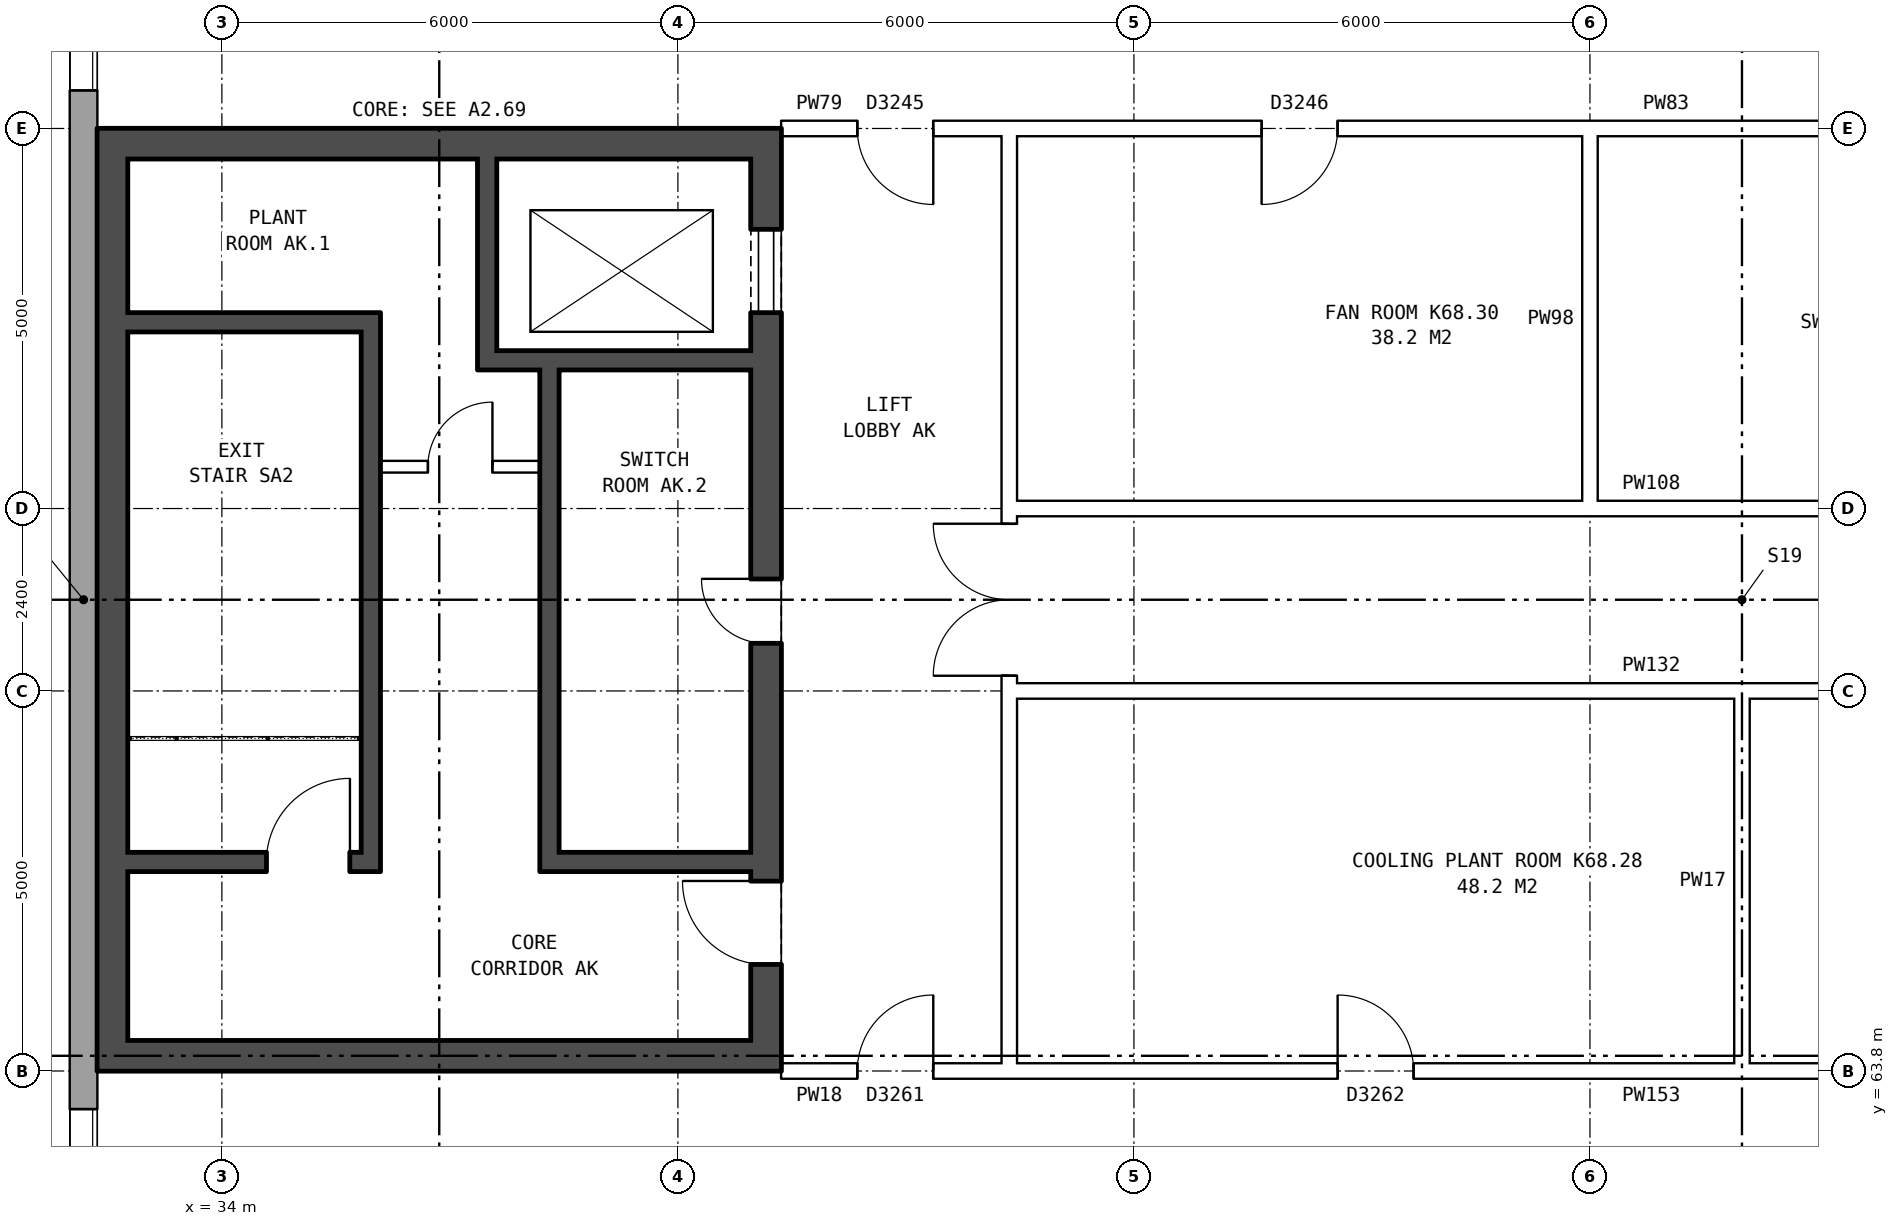
"""IFC4 building model, lengths in metres.
Left out: names, types, materials, properties, quantities, classifications, styles, units other than length and angle.
Written with IfcOpenShell. Run it as: python <this file> out.ifc"""

import sys

from ifc_helpers import new_model, si_unit, direction, frame, frame_2d, origin, place, context, subcontext, project, spatial, polyline, rectangle, outline, extrude, element, fill, save


model = new_model("IFC4")
c1 = context("Model", 3, precision=1e-05, world=origin(), true_north=direction((0.0, 1.0)))
c2 = subcontext(c1, "Body", "Model", "MODEL_VIEW")
j1 = project(units=[si_unit("LENGTHUNIT", "METRE"), si_unit("PLANEANGLEUNIT", "RADIAN")], contexts=[c1])
p1 = place(None, origin())
s1 = spatial("IfcSite", under=j1, at=p1, CompositionType="ELEMENT")
p2 = place(p1, origin())
s2 = spatial("IfcBuilding", under=s1, at=p2, CompositionType="ELEMENT")
p3 = place(p2, frame((0.0, 0.0, 243.9)))
s3 = spatial("IfcBuildingStorey", under=s2, at=p3, CompositionType="ELEMENT", Elevation=243.9)
p4 = place(p3, frame((32.18, 82.925, 0.0), z_axis=(0.0, 0.0, 1.0), x_axis=(0.0, -1.0, 0.0)))
e1 = element("IfcWall", 1, at=p4, inside=s3, PredefinedType="STANDARD", context=c2, shape_type="SweptSolid", body=[
    extrude(outline(polyline([(0.0, 0.0), (25.851, 0.0), (25.851, 4.837), (0.0, 17.763), (0.0, 0.0)])), frame((0.0, 0.18, 0.0), z_axis=(0.0, -1.0, 0.0), x_axis=(1.0, 0.0, 0.0)), (0.0, 0.0, 1.0), 0.36),
])
p5 = place(p4, frame((22.625, 0.0, 1.5)))
e2 = element("IfcOpeningElement", 2, at=p5, cuts=e1, PredefinedType="OPENING", context=c2, shape_type="SweptSolid", body=[
    extrude(rectangle(XDim=1.6, YDim=1.2, at=frame_2d((0.8, 0.6))), frame((0.0, 0.19, 0.0), z_axis=(0.0, -1.0, 0.0), x_axis=(1.0, 0.0, 0.0)), (0.0, 0.0, 1.0), 0.38),
])
p6 = place(p4, frame((19.625, 0.0, 1.5)))
e3 = element("IfcOpeningElement", 3, at=p6, cuts=e1, PredefinedType="OPENING", context=c2, shape_type="SweptSolid", body=[
    extrude(rectangle(XDim=1.6, YDim=1.2, at=frame_2d((0.8, 0.6))), frame((0.0, 0.19, 0.0), z_axis=(0.0, -1.0, 0.0), x_axis=(1.0, 0.0, 0.0)), (0.0, 0.0, 1.0), 0.38),
])
p7 = place(p4, frame((4.625, 0.0, 1.5)))
e4 = element("IfcOpeningElement", 4, at=p7, cuts=e1, PredefinedType="OPENING", context=c2, shape_type="SweptSolid", body=[
    extrude(rectangle(XDim=1.6, YDim=1.2, at=frame_2d((0.8, 0.6))), frame((0.0, 0.19, 0.0), z_axis=(0.0, -1.0, 0.0), x_axis=(1.0, 0.0, 0.0)), (0.0, 0.0, 1.0), 0.38),
])
p8 = place(p4, frame((1.625, 0.0, 1.5)))
e5 = element("IfcOpeningElement", 5, at=p8, cuts=e1, PredefinedType="OPENING", context=c2, shape_type="SweptSolid", body=[
    extrude(rectangle(XDim=1.6, YDim=1.2, at=frame_2d((0.8, 0.6))), frame((0.0, 0.19, 0.0), z_axis=(0.0, -1.0, 0.0), x_axis=(1.0, 0.0, 0.0)), (0.0, 0.0, 1.0), 0.38),
])
p9 = place(p3, frame((41.16, 76.2, 0.0), z_axis=(0.0, 0.0, 1.0), x_axis=(0.0, -1.0, 0.0)))
e6 = element("IfcWall", 6, at=p9, inside=s3, PredefinedType="SHEAR", context=c2, shape_type="SweptSolid", body=[
    extrude(rectangle(XDim=12.4, YDim=0.4, at=frame_2d((6.2, 0.0))), origin(), (0.0, 0.0, 1.0), 3.3),
])
p10 = place(p9, frame((1.325, 0.0, 0.0)))
e7 = element("IfcOpeningElement", 7, at=p10, cuts=e6, PredefinedType="OPENING", context=c2, shape_type="SweptSolid", body=[
    extrude(rectangle(XDim=1.1, YDim=2.1, at=frame_2d((0.55, 1.05))), frame((0.0, 0.21, 0.0), z_axis=(0.0, -1.0, 0.0), x_axis=(1.0, 0.0, 0.0)), (0.0, 0.0, 1.0), 0.42),
])
p11 = place(p9, frame((5.925, 0.0, 0.0)))
e8 = element("IfcOpeningElement", 8, at=p11, cuts=e6, PredefinedType="OPENING", context=c2, shape_type="SweptSolid", body=[
    extrude(rectangle(XDim=0.85, YDim=2.1, at=frame_2d((0.425, 1.05))), frame((0.0, 0.21, 0.0), z_axis=(0.0, -1.0, 0.0), x_axis=(1.0, 0.0, 0.0)), (0.0, 0.0, 1.0), 0.42),
])
p12 = place(p9, frame((9.9, 0.0, 0.0)))
e9 = element("IfcOpeningElement", 9, at=p12, cuts=e6, PredefinedType="OPENING", context=c2, shape_type="SweptSolid", body=[
    extrude(rectangle(XDim=1.1, YDim=2.1, at=frame_2d((0.55, 1.05))), frame((0.0, 0.21, 0.0), z_axis=(0.0, -1.0, 0.0), x_axis=(1.0, 0.0, 0.0)), (0.0, 0.0, 1.0), 0.42),
])
p13 = place(p3, frame((32.56, 76.2, 0.0), z_axis=(0.0, 0.0, 1.0), x_axis=(0.0, -1.0, 0.0)))
e10 = element("IfcWall", 10, at=p13, inside=s3, PredefinedType="SHEAR", context=c2, shape_type="SweptSolid", body=[
    extrude(rectangle(XDim=12.4, YDim=0.4, at=frame_2d((6.2, 0.0))), origin(), (0.0, 0.0, 1.0), 3.3),
])
for number, where, z_axis, x_axis in (
    (11, (40.96, 76.0, 0.0), (0.0, 0.0, 1.0), (-1.0, 0.0, 0.0)),
    (12, (40.96, 64.0, 0.0), (0.0, 0.0, 1.0), (-1.0, 0.0, 0.0)),
):
    element("IfcWall", number, at=place(p3, frame(where, z_axis=z_axis, x_axis=x_axis)), inside=s3, PredefinedType="SHEAR", context=c2, shape_type="SweptSolid", body=[
        extrude(rectangle(XDim=8.2, YDim=0.4, at=frame_2d((4.1, 0.0))), origin(), (0.0, 0.0, 1.0), 3.3),
    ])
p14 = place(p3, frame((35.835, 73.65, 0.0), z_axis=(0.0, 0.0, 1.0), x_axis=(-1.0, 0.0, 0.0)))
e13 = element("IfcWall", 13, at=p14, inside=s3, PredefinedType="SHEAR", context=c2, shape_type="SweptSolid", body=[
    extrude(rectangle(XDim=3.075, YDim=0.25, at=frame_2d((1.538, 0.0))), origin(), (0.0, 0.0, 1.0), 3.3),
])
p15 = place(p3, frame((40.96, 73.15, 0.0), z_axis=(0.0, 0.0, 1.0), x_axis=(-1.0, 0.0, 0.0)))
e14 = element("IfcWall", 14, at=p15, inside=s3, PredefinedType="SHEAR", context=c2, shape_type="SweptSolid", body=[
    extrude(rectangle(XDim=3.595, YDim=0.25, at=frame_2d((1.797, 0.0))), origin(), (0.0, 0.0, 1.0), 3.3),
])
p16 = place(p3, frame((38.185, 71.75, 0.0), z_axis=(0.0, 0.0, 1.0), x_axis=(-1.0, 0.0, 0.0)))
e15 = element("IfcWall", 15, at=p16, inside=s3, PredefinedType="PARTITIONING", context=c2, shape_type="SweptSolid", body=[
    extrude(rectangle(XDim=2.1, YDim=0.15, at=frame_2d((1.05, 0.0))), origin(), (0.0, 0.0, 1.0), 3.3),
])
p17 = place(p16, frame((0.625, 0.0, 0.0)))
e16 = element("IfcOpeningElement", 16, at=p17, cuts=e15, PredefinedType="OPENING", context=c2, shape_type="SweptSolid", body=[
    extrude(rectangle(XDim=0.85, YDim=2.1, at=frame_2d((0.425, 1.05))), frame((0.0, 0.085, 0.0), z_axis=(0.0, -1.0, 0.0), x_axis=(1.0, 0.0, 0.0)), (0.0, 0.0, 1.0), 0.17),
])
p18 = place(p3, frame((40.96, 66.55, 0.0), z_axis=(0.0, 0.0, 1.0), x_axis=(-1.0, 0.0, 0.0)))
e17 = element("IfcWall", 17, at=p18, inside=s3, PredefinedType="SHEAR", context=c2, shape_type="SweptSolid", body=[
    extrude(rectangle(XDim=2.525, YDim=0.25, at=frame_2d((1.262, 0.0))), origin(), (0.0, 0.0, 1.0), 3.3),
])
p19 = place(p3, frame((35.835, 66.55, 0.0), z_axis=(0.0, 0.0, 1.0), x_axis=(-1.0, 0.0, 0.0)))
e18 = element("IfcWall", 18, at=p19, inside=s3, PredefinedType="SHEAR", context=c2, shape_type="SweptSolid", body=[
    extrude(rectangle(XDim=3.075, YDim=0.25, at=frame_2d((1.538, 0.0))), origin(), (0.0, 0.0, 1.0), 3.3),
])
p20 = place(p19, frame((0.15, 0.0, 0.0)))
e19 = element("IfcOpeningElement", 19, at=p20, cuts=e18, PredefinedType="OPENING", context=c2, shape_type="SweptSolid", body=[
    extrude(rectangle(XDim=1.1, YDim=2.1, at=frame_2d((0.55, 1.05))), frame((0.0, 0.135, 0.0), z_axis=(0.0, -1.0, 0.0), x_axis=(1.0, 0.0, 0.0)), (0.0, 0.0, 1.0), 0.27),
])
p21 = place(p3, frame((38.31, 73.025, 0.0), z_axis=(0.0, 0.0, 1.0), x_axis=(0.0, -1.0, 0.0)))
e20 = element("IfcWall", 20, at=p21, inside=s3, PredefinedType="SHEAR", context=c2, shape_type="SweptSolid", body=[
    extrude(rectangle(XDim=6.6, YDim=0.25, at=frame_2d((3.3, 0.0))), origin(), (0.0, 0.0, 1.0), 3.3),
])
p22 = place(p3, frame((37.49, 75.8, 0.0), z_axis=(0.0, 0.0, 1.0), x_axis=(0.0, -1.0, 0.0)))
e21 = element("IfcWall", 21, at=p22, inside=s3, PredefinedType="SHEAR", context=c2, shape_type="SweptSolid", body=[
    extrude(rectangle(XDim=2.525, YDim=0.25, at=frame_2d((1.263, 0.0))), origin(), (0.0, 0.0, 1.0), 3.3),
])
p23 = place(p3, frame((35.96, 73.775, 0.0), z_axis=(0.0, 0.0, 1.0), x_axis=(0.0, -1.0, 0.0)))
e22 = element("IfcWall", 22, at=p23, inside=s3, PredefinedType="SHEAR", context=c2, shape_type="SweptSolid", body=[
    extrude(rectangle(XDim=7.35, YDim=0.25, at=frame_2d((3.675, 0.0))), origin(), (0.0, 0.0, 1.0), 3.3),
])
p24 = place(p3, frame((44.36, 63.9, 0.0), z_axis=(0.0, 0.0, 1.0), x_axis=(0.0, 1.0, 0.0)))
e23 = element("IfcWall", 23, at=p24, inside=s3, PredefinedType="PARTITIONING", context=c2, shape_type="SweptSolid", body=[
    extrude(rectangle(XDim=12.2, YDim=0.2, at=frame_2d((6.1, 0.0))), origin(), (0.0, 0.0, 1.0), 3.3),
])
p25 = place(p24, frame((5.1, 0.0, 0.0)))
e24 = element("IfcOpeningElement", 24, at=p25, cuts=e23, PredefinedType="OPENING", context=c2, shape_type="SweptSolid", body=[
    extrude(rectangle(XDim=2.0, YDim=2.1, at=frame_2d((1.0, 1.05))), frame((0.0, 0.11, 0.0), z_axis=(0.0, -1.0, 0.0), x_axis=(1.0, 0.0, 0.0)), (0.0, 0.0, 1.0), 0.22),
])
p26 = place(p3, frame((44.36, 63.8, 0.0), z_axis=(0.0, 0.0, 1.0), x_axis=(1.0, 0.0, 0.0)))
e25 = element("IfcWall", 25, at=p26, inside=s3, PredefinedType="PARTITIONING", context=c2, shape_type="SweptSolid", body=[
    extrude(rectangle(XDim=19.28, YDim=0.2, at=frame_2d((9.64, 0.0))), origin(), (0.0, 0.0, 1.0), 3.3),
])
p27 = place(p26, frame((4.32, 0.0, 0.0)))
e26 = element("IfcOpeningElement", 26, at=p27, cuts=e25, PredefinedType="OPENING", context=c2, shape_type="SweptSolid", body=[
    extrude(rectangle(XDim=1.0, YDim=2.1, at=frame_2d((0.5, 1.05))), frame((0.0, 0.11, 0.0), z_axis=(0.0, -1.0, 0.0), x_axis=(1.0, 0.0, 0.0)), (0.0, 0.0, 1.0), 0.22),
])
p28 = place(p26, frame((13.96, 0.0, 0.0)))
e27 = element("IfcOpeningElement", 27, at=p28, cuts=e25, PredefinedType="OPENING", context=c2, shape_type="SweptSolid", body=[
    extrude(rectangle(XDim=1.0, YDim=2.1, at=frame_2d((0.5, 1.05))), frame((0.0, 0.11, 0.0), z_axis=(0.0, -1.0, 0.0), x_axis=(1.0, 0.0, 0.0)), (0.0, 0.0, 1.0), 0.22),
])
p29 = place(p3, frame((41.36, 63.8, 0.0), z_axis=(0.0, 0.0, 1.0), x_axis=(1.0, 0.0, 0.0)))
e28 = element("IfcWall", 28, at=p29, inside=s3, PredefinedType="PARTITIONING", context=c2, shape_type="SweptSolid", body=[
    extrude(rectangle(XDim=3.0, YDim=0.2, at=frame_2d((1.5, 0.0))), origin(), (0.0, 0.0, 1.0), 3.3),
])
p30 = place(p29, frame((1.0, 0.0, 0.0)))
e29 = element("IfcOpeningElement", 29, at=p30, cuts=e28, PredefinedType="OPENING", context=c2, shape_type="SweptSolid", body=[
    extrude(rectangle(XDim=1.0, YDim=2.1, at=frame_2d((0.5, 1.05))), frame((0.0, 0.11, 0.0), z_axis=(0.0, -1.0, 0.0), x_axis=(1.0, 0.0, 0.0)), (0.0, 0.0, 1.0), 0.22),
])
for number, where, z_axis, x_axis in (
    (30, (44.36, 68.8, 0.0), (0.0, 0.0, 1.0), (1.0, 0.0, 0.0)),
    (31, (44.36, 71.2, 0.0), (0.0, 0.0, 1.0), (1.0, 0.0, 0.0)),
):
    element("IfcWall", number, at=place(p3, frame(where, z_axis=z_axis, x_axis=x_axis)), inside=s3, PredefinedType="PARTITIONING", context=c2, shape_type="SweptSolid", body=[
        extrude(rectangle(XDim=19.28, YDim=0.2, at=frame_2d((9.64, 0.0))), origin(), (0.0, 0.0, 1.0), 3.3),
    ])
p31 = place(p3, frame((44.36, 76.2, 0.0), z_axis=(0.0, 0.0, 1.0), x_axis=(1.0, 0.0, 0.0)))
e32 = element("IfcWall", 32, at=p31, inside=s3, PredefinedType="PARTITIONING", context=c2, shape_type="SweptSolid", body=[
    extrude(rectangle(XDim=19.28, YDim=0.2, at=frame_2d((9.64, 0.0))), origin(), (0.0, 0.0, 1.0), 3.3),
])
p32 = place(p31, frame((3.32, 0.0, 0.0)))
e33 = element("IfcOpeningElement", 33, at=p32, cuts=e32, PredefinedType="OPENING", context=c2, shape_type="SweptSolid", body=[
    extrude(rectangle(XDim=1.0, YDim=2.1, at=frame_2d((0.5, 1.05))), frame((0.0, 0.11, 0.0), z_axis=(0.0, -1.0, 0.0), x_axis=(1.0, 0.0, 0.0)), (0.0, 0.0, 1.0), 0.22),
])
p33 = place(p31, frame((12.96, 0.0, 0.0)))
e34 = element("IfcOpeningElement", 34, at=p33, cuts=e32, PredefinedType="OPENING", context=c2, shape_type="SweptSolid", body=[
    extrude(rectangle(XDim=1.0, YDim=2.1, at=frame_2d((0.5, 1.05))), frame((0.0, 0.11, 0.0), z_axis=(0.0, -1.0, 0.0), x_axis=(1.0, 0.0, 0.0)), (0.0, 0.0, 1.0), 0.22),
])
p34 = place(p3, frame((41.36, 76.2, 0.0), z_axis=(0.0, 0.0, 1.0), x_axis=(1.0, 0.0, 0.0)))
e35 = element("IfcWall", 35, at=p34, inside=s3, PredefinedType="PARTITIONING", context=c2, shape_type="SweptSolid", body=[
    extrude(rectangle(XDim=3.0, YDim=0.2, at=frame_2d((1.5, 0.0))), origin(), (0.0, 0.0, 1.0), 3.3),
])
p35 = place(p34, frame((1.0, 0.0, 0.0)))
e36 = element("IfcOpeningElement", 36, at=p35, cuts=e35, PredefinedType="OPENING", context=c2, shape_type="SweptSolid", body=[
    extrude(rectangle(XDim=1.0, YDim=2.1, at=frame_2d((0.5, 1.05))), frame((0.0, 0.11, 0.0), z_axis=(0.0, -1.0, 0.0), x_axis=(1.0, 0.0, 0.0)), (0.0, 0.0, 1.0), 0.22),
])
for number, where, z_axis, x_axis in (
    (37, (52.0, 71.1, 0.0), (0.0, 0.0, 1.0), (0.0, 1.0, 0.0)),
    (38, (54.0, 63.7, 0.0), (0.0, 0.0, 1.0), (0.0, 1.0, 0.0)),
):
    element("IfcWall", number, at=place(p3, frame(where, z_axis=z_axis, x_axis=x_axis)), inside=s3, PredefinedType="PARTITIONING", context=c2, shape_type="SweptSolid", body=[
        extrude(rectangle(XDim=5.2, YDim=0.2, at=frame_2d((2.6, 0.0))), origin(), (0.0, 0.0, 1.0), 3.3),
    ])
p36 = place(p6, origin())
e39 = element("IfcWindow", 39, at=p36, inside=s3, PartitioningType="DOUBLE_PANEL_HORIZONTAL", PredefinedType="WINDOW", context=c2, shape_type="SweptSolid", body=[
    extrude(rectangle(XDim=1.6, YDim=1.2, at=frame_2d((0.8, 0.6))), frame((0.0, 0.15, 0.0), z_axis=(0.0, -1.0, 0.0), x_axis=(1.0, 0.0, 0.0)), (0.0, 0.0, 1.0), 0.06),
])
fill(e3, e39)
p37 = place(p7, origin())
e40 = element("IfcWindow", 40, at=p37, inside=s3, PartitioningType="DOUBLE_PANEL_HORIZONTAL", PredefinedType="WINDOW", context=c2, shape_type="SweptSolid", body=[
    extrude(rectangle(XDim=1.6, YDim=1.2, at=frame_2d((0.8, 0.6))), frame((0.0, 0.15, 0.0), z_axis=(0.0, -1.0, 0.0), x_axis=(1.0, 0.0, 0.0)), (0.0, 0.0, 1.0), 0.06),
])
fill(e4, e40)
p38 = place(p10, origin())
e41 = element("IfcDoor", 41, at=p38, inside=s3, OperationType="DOUBLE_DOOR_SLIDING", PredefinedType="DOOR", context=c2, shape_type="SweptSolid", body=[
    extrude(rectangle(XDim=1.1, YDim=2.1, at=frame_2d((0.55, 1.05))), frame((0.0, -0.135, 0.0), z_axis=(0.0, -1.0, 0.0), x_axis=(1.0, 0.0, 0.0)), (0.0, 0.0, 1.0), 0.05),
])
fill(e7, e41)
p39 = place(p11, frame((0.85, 0.0, 0.0), z_axis=(0.0, 0.0, 1.0), x_axis=(-1.0, 0.0, 0.0)))
e42 = element("IfcDoor", 42, at=p39, inside=s3, OperationType="SINGLE_SWING_RIGHT", PredefinedType="DOOR", context=c2, shape_type="SweptSolid", body=[
    extrude(rectangle(XDim=0.85, YDim=2.1, at=frame_2d((0.425, 1.05))), frame((0.0, 0.185, 0.0), z_axis=(0.0, -1.0, 0.0), x_axis=(1.0, 0.0, 0.0)), (0.0, 0.0, 1.0), 0.05),
])
fill(e8, e42)
p40 = place(p12, frame((1.1, 0.0, 0.0), z_axis=(0.0, 0.0, 1.0), x_axis=(-1.0, 0.0, 0.0)))
e43 = element("IfcDoor", 43, at=p40, inside=s3, OperationType="SINGLE_SWING_RIGHT", PredefinedType="DOOR", context=c2, shape_type="SweptSolid", body=[
    extrude(rectangle(XDim=1.1, YDim=2.1, at=frame_2d((0.55, 1.05))), frame((0.0, 0.185, 0.0), z_axis=(0.0, -1.0, 0.0), x_axis=(1.0, 0.0, 0.0)), (0.0, 0.0, 1.0), 0.05),
])
fill(e9, e43)
p41 = place(p20, frame((1.1, 0.0, 0.0), z_axis=(0.0, 0.0, 1.0), x_axis=(-1.0, 0.0, 0.0)))
e44 = element("IfcDoor", 44, at=p41, inside=s3, OperationType="SINGLE_SWING_RIGHT", PredefinedType="DOOR", context=c2, shape_type="SweptSolid", body=[
    extrude(rectangle(XDim=1.1, YDim=2.1, at=frame_2d((0.55, 1.05))), frame((0.0, 0.025, 0.0), z_axis=(0.0, -1.0, 0.0), x_axis=(1.0, 0.0, 0.0)), (0.0, 0.0, 1.0), 0.05),
])
fill(e19, e44)
p42 = place(p17, frame((0.85, 0.0, 0.0), z_axis=(0.0, 0.0, 1.0), x_axis=(-1.0, 0.0, 0.0)))
e45 = element("IfcDoor", 45, at=p42, inside=s3, OperationType="SINGLE_SWING_RIGHT", PredefinedType="DOOR", context=c2, shape_type="SweptSolid", body=[
    extrude(rectangle(XDim=0.85, YDim=2.1, at=frame_2d((0.425, 1.05))), frame((0.0, 0.025, 0.0), z_axis=(0.0, -1.0, 0.0), x_axis=(1.0, 0.0, 0.0)), (0.0, 0.0, 1.0), 0.05),
])
fill(e16, e45)
p43 = place(p25, origin())
e46 = element("IfcDoor", 46, at=p43, inside=s3, OperationType="DOUBLE_DOOR_SINGLE_SWING", PredefinedType="DOOR", context=c2, shape_type="SweptSolid", body=[
    extrude(rectangle(XDim=2.0, YDim=2.1, at=frame_2d((1.0, 1.05))), frame((0.0, 0.025, 0.0), z_axis=(0.0, -1.0, 0.0), x_axis=(1.0, 0.0, 0.0)), (0.0, 0.0, 1.0), 0.05),
])
fill(e24, e46)
p44 = place(p27, origin())
e47 = element("IfcDoor", 47, at=p44, inside=s3, OperationType="SINGLE_SWING_LEFT", PredefinedType="DOOR", context=c2, shape_type="SweptSolid", body=[
    extrude(rectangle(XDim=1.0, YDim=2.1, at=frame_2d((0.5, 1.05))), frame((0.0, 0.025, 0.0), z_axis=(0.0, -1.0, 0.0), x_axis=(1.0, 0.0, 0.0)), (0.0, 0.0, 1.0), 0.05),
])
fill(e26, e47)
p45 = place(p30, origin())
e48 = element("IfcDoor", 48, at=p45, inside=s3, OperationType="SINGLE_SWING_RIGHT", PredefinedType="DOOR", context=c2, shape_type="SweptSolid", body=[
    extrude(rectangle(XDim=1.0, YDim=2.1, at=frame_2d((0.5, 1.05))), frame((0.0, 0.025, 0.0), z_axis=(0.0, -1.0, 0.0), x_axis=(1.0, 0.0, 0.0)), (0.0, 0.0, 1.0), 0.05),
])
fill(e29, e48)
p46 = place(p32, frame((1.0, 0.0, 0.0), z_axis=(0.0, 0.0, 1.0), x_axis=(-1.0, 0.0, 0.0)))
e49 = element("IfcDoor", 49, at=p46, inside=s3, OperationType="SINGLE_SWING_RIGHT", PredefinedType="DOOR", context=c2, shape_type="SweptSolid", body=[
    extrude(rectangle(XDim=1.0, YDim=2.1, at=frame_2d((0.5, 1.05))), frame((0.0, 0.025, 0.0), z_axis=(0.0, -1.0, 0.0), x_axis=(1.0, 0.0, 0.0)), (0.0, 0.0, 1.0), 0.05),
])
fill(e33, e49)
p47 = place(p35, frame((1.0, 0.0, 0.0), z_axis=(0.0, 0.0, 1.0), x_axis=(-1.0, 0.0, 0.0)))
e50 = element("IfcDoor", 50, at=p47, inside=s3, OperationType="SINGLE_SWING_LEFT", PredefinedType="DOOR", context=c2, shape_type="SweptSolid", body=[
    extrude(rectangle(XDim=1.0, YDim=2.1, at=frame_2d((0.5, 1.05))), frame((0.0, 0.025, 0.0), z_axis=(0.0, -1.0, 0.0), x_axis=(1.0, 0.0, 0.0)), (0.0, 0.0, 1.0), 0.05),
])
fill(e36, e50)
save(model, sys.argv[1])
